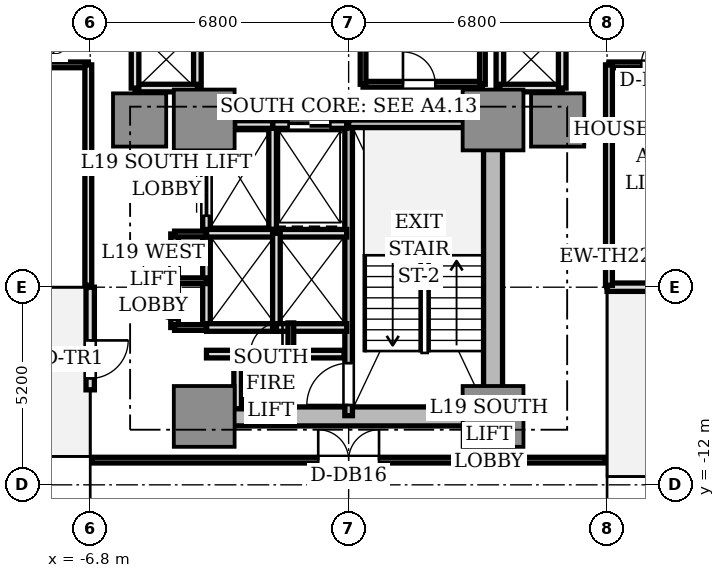
"""IFC4 building model, lengths in metres.
Left out: names, types, materials, properties, quantities, classifications, styles, units other than length and angle.
Written with IfcOpenShell. Run it as: python <this file> out.ifc"""

import sys

from ifc_helpers import new_model, si_unit, direction, frame, frame_2d, origin, origin_2d, place, context, subcontext, project, spatial, rectangle, extrude, source, transform, mapped, element, fill, save


model = new_model("IFC4")
c1 = context("Model", 3, precision=1e-05, world=origin(), true_north=direction((0.0, 1.0)))
c2 = subcontext(c1, "Body", "Model", "MODEL_VIEW")
j1 = project(units=[si_unit("LENGTHUNIT", "METRE"), si_unit("PLANEANGLEUNIT", "RADIAN")], contexts=[c1])
p1 = place(None, origin())
s1 = spatial("IfcSite", under=j1, at=p1, CompositionType="ELEMENT")
p2 = place(p1, origin())
s2 = spatial("IfcBuilding", under=s1, at=p2, CompositionType="ELEMENT")
p3 = place(p2, frame((0.0, 0.0, 71.15)))
s3 = spatial("IfcBuildingStorey", under=s2, at=p3, CompositionType="ELEMENT", Elevation=71.15)
p4 = place(p3, frame((-3.55, -10.2, 0.0), z_axis=(0.0, 0.0, 1.0), x_axis=(1.0, 0.0, 0.0)))
e1 = element("IfcWall", 1, at=p4, inside=s3, PredefinedType="SHEAR", context=c2, shape_type="SweptSolid", body=[
    extrude(rectangle(XDim=7.1, YDim=0.5, at=frame_2d((3.55, 0.0))), origin(), (0.0, 0.0, 1.0), 3.03),
])
p5 = place(p3, frame((3.8, -9.75, 0.0), z_axis=(0.0, 0.0, 1.0), x_axis=(0.0, 1.0, 0.0)))
e2 = element("IfcWall", 2, at=p5, inside=s3, PredefinedType="SHEAR", context=c2, shape_type="SweptSolid", body=[
    extrude(rectangle(XDim=6.9, YDim=0.5, at=frame_2d((3.45, 0.0))), origin(), (0.0, 0.0, 1.0), 3.03),
])
m1 = source(origin(), c2, "Body", "SweptSolid", [
    extrude(rectangle(XDim=1.6, YDim=1.6, at=origin_2d()), origin(), (0.0, 0.0, 1.0), 3.03),
])
for number, where, z_axis, x_axis in (
    (3, (-3.8, -2.4, 0.0), (0.0, 0.0, 1.0), (1.0, 0.0, 0.0)),
    (4, (3.8, -2.4, 0.0), (0.0, 0.0, 1.0), (1.0, 0.0, 0.0)),
    (5, (-3.8, -10.2, 0.0), (0.0, 0.0, 1.0), (1.0, 0.0, 0.0)),
    (6, (3.8, -10.2, 0.0), (0.0, 0.0, 1.0), (1.0, 0.0, 0.0)),
):
    element("IfcColumn", number, at=place(p3, frame(where, z_axis=z_axis, x_axis=x_axis)), inside=s3, PredefinedType="COLUMN", context=c2, shape_type="MappedRepresentation", body=[
        mapped(m1, transform((0.0, 0.0, 0.0), scale=1.0)),
    ])
m2 = source(origin(), c2, "Body", "SweptSolid", [
    extrude(rectangle(XDim=1.4, YDim=1.4, at=origin_2d()), origin(), (0.0, 0.0, 1.0), 3.03),
])
for number, where, z_axis, x_axis in (
    (7, (5.5, -2.4, 0.0), (0.0, 0.0, 1.0), (1.0, 0.0, 0.0)),
    (8, (-5.5, -2.4, 0.0), (0.0, 0.0, 1.0), (1.0, 0.0, 0.0)),
):
    element("IfcColumn", number, at=place(p3, frame(where, z_axis=z_axis, x_axis=x_axis)), inside=s3, PredefinedType="COLUMN", context=c2, shape_type="MappedRepresentation", body=[
        mapped(m2, transform((0.0, 0.0, 0.0), scale=1.0)),
    ])
p6 = place(p3, frame((6.8, -6.8, 0.0), z_axis=(0.0, 0.0, 1.0), x_axis=(1.0, 0.0, 0.0)))
e9 = element("IfcWall", 9, at=p6, inside=s3, PredefinedType="STANDARD", context=c2, shape_type="SweptSolid", body=[
    extrude(rectangle(XDim=2.7, YDim=0.22, at=frame_2d((1.35, 0.0))), origin(), (0.0, 0.0, 1.0), 3.03),
])
p7 = place(p6, frame((1.4, 0.0, 0.0)))
e10 = element("IfcOpeningElement", 10, at=p7, cuts=e9, PredefinedType="OPENING", context=c2, shape_type="SweptSolid", body=[
    extrude(rectangle(XDim=1.0, YDim=2.2, at=frame_2d((0.5, 1.1))), frame((0.0, 0.12, 0.0), z_axis=(0.0, -1.0, 0.0), x_axis=(1.0, 0.0, 0.0)), (0.0, 0.0, 1.0), 0.24),
])
p8 = place(p3, frame((-6.8, -6.8, 0.0), z_axis=(0.0, 0.0, 1.0), x_axis=(0.0, -1.0, 0.0)))
e11 = element("IfcWall", 11, at=p8, inside=s3, PredefinedType="STANDARD", context=c2, shape_type="SweptSolid", body=[
    extrude(rectangle(XDim=2.7, YDim=0.22, at=frame_2d((1.35, 0.0))), origin(), (0.0, 0.0, 1.0), 3.03),
])
p9 = place(p8, frame((1.4, 0.0, 0.0)))
e12 = element("IfcOpeningElement", 12, at=p9, cuts=e11, PredefinedType="OPENING", context=c2, shape_type="SweptSolid", body=[
    extrude(rectangle(XDim=1.0, YDim=2.2, at=frame_2d((0.5, 1.1))), frame((0.0, 0.12, 0.0), z_axis=(0.0, -1.0, 0.0), x_axis=(1.0, 0.0, 0.0)), (0.0, 0.0, 1.0), 0.24),
])
p10 = place(p3, frame((0.0, -10.18, 0.0), z_axis=(0.0, 0.0, 1.0), x_axis=(0.0, 1.0, 0.0)))
e13 = element("IfcWall", 13, at=p10, inside=s3, PredefinedType="SOLIDWALL", context=c2, shape_type="SweptSolid", body=[
    extrude(rectangle(XDim=7.68, YDim=0.2, at=frame_2d((3.84, 0.0))), origin(), (0.0, 0.0, 1.0), 3.03),
])
p11 = place(p10, frame((0.28, 0.0, 0.0)))
e14 = element("IfcOpeningElement", 14, at=p11, cuts=e13, PredefinedType="OPENING", context=c2, shape_type="SweptSolid", body=[
    extrude(rectangle(XDim=1.1, YDim=2.15, at=frame_2d((0.55, 1.075))), frame((0.0, 0.11, 0.0), z_axis=(0.0, -1.0, 0.0), x_axis=(1.0, 0.0, 0.0)), (0.0, 0.0, 1.0), 0.22),
])
p12 = place(p3, frame((0.0, -2.5, 0.0), z_axis=(0.0, 0.0, 1.0), x_axis=(1.0, 0.0, 0.0)))
e15 = element("IfcWall", 15, at=p12, inside=s3, PredefinedType="SOLIDWALL", context=c2, shape_type="SweptSolid", body=[
    extrude(rectangle(XDim=3.72, YDim=0.2, at=frame_2d((1.86, 0.0))), origin(), (0.0, 0.0, 1.0), 3.03),
])
p13 = place(p3, frame((-2.0, -5.28, 0.0), z_axis=(0.0, 0.0, 1.0), x_axis=(0.0, 1.0, 0.0)))
e16 = element("IfcWall", 16, at=p13, inside=s3, PredefinedType="SOLIDWALL", context=c2, shape_type="SweptSolid", body=[
    extrude(rectangle(XDim=2.78, YDim=0.2, at=frame_2d((1.39, 0.0))), origin(), (0.0, 0.0, 1.0), 2.58),
])
p14 = place(p3, frame((-2.0, -2.52, 0.0), z_axis=(0.0, 0.0, 1.0), x_axis=(1.0, 0.0, 0.0)))
e17 = element("IfcWall", 17, at=p14, inside=s3, PredefinedType="SOLIDWALL", context=c2, shape_type="SweptSolid", body=[
    extrude(rectangle(XDim=1.95, YDim=0.2, at=frame_2d((0.975, 0.0))), origin(), (0.0, 0.0, 1.0), 2.58),
])
p15 = place(p14, frame((0.42, 0.0, 0.0)))
e18 = element("IfcOpeningElement", 18, at=p15, cuts=e17, PredefinedType="OPENING", context=c2, shape_type="SweptSolid", body=[
    extrude(rectangle(XDim=1.1, YDim=2.2, at=frame_2d((0.55, 1.1))), frame((0.0, 0.11, 0.0), z_axis=(0.0, -1.0, 0.0), x_axis=(1.0, 0.0, 0.0)), (0.0, 0.0, 1.0), 0.22),
])
p16 = place(p3, frame((-3.0, -2.52, 0.0), z_axis=(0.0, 0.0, 1.0), x_axis=(1.0, 0.0, 0.0)))
e19 = element("IfcWall", 19, at=p16, inside=s3, PredefinedType="SOLIDWALL", context=c2, shape_type="SweptSolid", body=[
    extrude(rectangle(XDim=1.0, YDim=0.2, at=frame_2d((0.5, 0.0))), origin(), (0.0, 0.0, 1.0), 2.58),
])
p17 = place(p3, frame((-3.74, -5.36, 0.0), z_axis=(0.0, 0.0, 1.0), x_axis=(0.0, 1.0, 0.0)))
e20 = element("IfcWall", 20, at=p17, inside=s3, PredefinedType="SOLIDWALL", context=c2, shape_type="SweptSolid", body=[
    extrude(rectangle(XDim=2.08, YDim=0.2, at=frame_2d((1.04, 0.0))), origin(), (0.0, 0.0, 1.0), 2.58),
])
p18 = place(p17, frame((0.44, 0.0, 0.0)))
e21 = element("IfcOpeningElement", 21, at=p18, cuts=e20, PredefinedType="OPENING", context=c2, shape_type="SweptSolid", body=[
    extrude(rectangle(XDim=1.2, YDim=2.2, at=frame_2d((0.6, 1.1))), frame((0.0, 0.11, 0.0), z_axis=(0.0, -1.0, 0.0), x_axis=(1.0, 0.0, 0.0)), (0.0, 0.0, 1.0), 0.22),
])
p19 = place(p3, frame((-3.74, -7.86, 0.0), z_axis=(0.0, 0.0, 1.0), x_axis=(0.0, 1.0, 0.0)))
e22 = element("IfcWall", 22, at=p19, inside=s3, PredefinedType="SOLIDWALL", context=c2, shape_type="SweptSolid", body=[
    extrude(rectangle(XDim=2.48, YDim=0.2, at=frame_2d((1.24, 0.0))), origin(), (0.0, 0.0, 1.0), 2.58),
])
p20 = place(p3, frame((-3.74, -7.86, 0.0), z_axis=(0.0, 0.0, 1.0), x_axis=(1.0, 0.0, 0.0)))
e23 = element("IfcWall", 23, at=p20, inside=s3, PredefinedType="SOLIDWALL", context=c2, shape_type="SweptSolid", body=[
    extrude(rectangle(XDim=1.84, YDim=0.2, at=frame_2d((0.92, 0.0))), origin(), (0.0, 0.0, 1.0), 2.58),
])
p21 = place(p3, frame((-3.74, -5.38, 0.0), z_axis=(0.0, 0.0, 1.0), x_axis=(1.0, 0.0, 0.0)))
e24 = element("IfcWall", 24, at=p21, inside=s3, PredefinedType="SOLIDWALL", context=c2, shape_type="SweptSolid", body=[
    extrude(rectangle(XDim=3.69, YDim=0.2, at=frame_2d((1.845, 0.0))), origin(), (0.0, 0.0, 1.0), 2.58),
])
p22 = place(p3, frame((-1.9, -7.86, 0.0), z_axis=(0.0, 0.0, 1.0), x_axis=(0.0, 1.0, 0.0)))
e25 = element("IfcWall", 25, at=p22, inside=s3, PredefinedType="SOLIDWALL", context=c2, shape_type="SweptSolid", body=[
    extrude(rectangle(XDim=2.48, YDim=0.2, at=frame_2d((1.24, 0.0))), origin(), (0.0, 0.0, 1.0), 2.58),
])
p23 = place(p3, frame((-1.9, -7.86, 0.0), z_axis=(0.0, 0.0, 1.0), x_axis=(1.0, 0.0, 0.0)))
e26 = element("IfcWall", 26, at=p23, inside=s3, PredefinedType="SOLIDWALL", context=c2, shape_type="SweptSolid", body=[
    extrude(rectangle(XDim=1.85, YDim=0.2, at=frame_2d((0.925, 0.0))), origin(), (0.0, 0.0, 1.0), 2.58),
])
p24 = place(p3, frame((3.98, -1.56, 0.0), z_axis=(0.0, 0.0, 1.0), x_axis=(0.0, 1.0, 0.0)))
e27 = element("IfcWall", 27, at=p24, inside=s3, PredefinedType="SOLIDWALL", context=c2, shape_type="SweptSolid", body=[
    extrude(rectangle(XDim=3.12, YDim=0.2, at=frame_2d((1.56, 0.0))), origin(), (0.0, 0.0, 1.0), 2.1),
])
p25 = place(p3, frame((3.98, -1.56, 0.0), z_axis=(0.0, 0.0, 1.0), x_axis=(1.0, 0.0, 0.0)))
e28 = element("IfcWall", 28, at=p25, inside=s3, PredefinedType="SOLIDWALL", context=c2, shape_type="SweptSolid", body=[
    extrude(rectangle(XDim=1.64, YDim=0.2, at=frame_2d((0.82, 0.0))), origin(), (0.0, 0.0, 1.0), 2.58),
])
p26 = place(p3, frame((5.62, -1.56, 0.0), z_axis=(0.0, 0.0, 1.0), x_axis=(0.0, 1.0, 0.0)))
e29 = element("IfcWall", 29, at=p26, inside=s3, PredefinedType="SOLIDWALL", context=c2, shape_type="SweptSolid", body=[
    extrude(rectangle(XDim=1.56, YDim=0.2, at=frame_2d((0.78, 0.0))), origin(), (0.0, 0.0, 1.0), 2.58),
])
p27 = place(p3, frame((-3.98, -1.56, 0.0), z_axis=(0.0, 0.0, 1.0), x_axis=(0.0, 1.0, 0.0)))
e30 = element("IfcWall", 30, at=p27, inside=s3, PredefinedType="SOLIDWALL", context=c2, shape_type="SweptSolid", body=[
    extrude(rectangle(XDim=3.12, YDim=0.2, at=frame_2d((1.56, 0.0))), origin(), (0.0, 0.0, 1.0), 2.1),
])
p28 = place(p3, frame((-5.62, -1.56, 0.0), z_axis=(0.0, 0.0, 1.0), x_axis=(1.0, 0.0, 0.0)))
e31 = element("IfcWall", 31, at=p28, inside=s3, PredefinedType="SOLIDWALL", context=c2, shape_type="SweptSolid", body=[
    extrude(rectangle(XDim=1.64, YDim=0.2, at=frame_2d((0.82, 0.0))), origin(), (0.0, 0.0, 1.0), 2.58),
])
p29 = place(p3, frame((-5.62, -1.56, 0.0), z_axis=(0.0, 0.0, 1.0), x_axis=(0.0, 1.0, 0.0)))
e32 = element("IfcWall", 32, at=p29, inside=s3, PredefinedType="SOLIDWALL", context=c2, shape_type="SweptSolid", body=[
    extrude(rectangle(XDim=1.56, YDim=0.2, at=frame_2d((0.78, 0.0))), origin(), (0.0, 0.0, 1.0), 2.58),
])
p30 = place(p3, frame((-3.74, -8.56, 0.0), z_axis=(0.0, 0.0, 1.0), x_axis=(1.0, 0.0, 0.0)))
e33 = element("IfcWall", 33, at=p30, inside=s3, PredefinedType="SOLIDWALL", context=c2, shape_type="SweptSolid", body=[
    extrude(rectangle(XDim=3.62, YDim=0.2, at=frame_2d((1.81, 0.0))), origin(), (0.0, 0.0, 1.0), 2.58),
])
p31 = place(p30, frame((1.15, 0.0, 0.0)))
e34 = element("IfcOpeningElement", 34, at=p31, cuts=e33, PredefinedType="OPENING", context=c2, shape_type="SweptSolid", body=[
    extrude(rectangle(XDim=0.85, YDim=2.1, at=frame_2d((0.425, 1.05))), frame((0.0, 0.11, 0.0), z_axis=(0.0, -1.0, 0.0), x_axis=(1.0, 0.0, 0.0)), (0.0, 0.0, 1.0), 0.22),
])
p32 = place(p3, frame((-2.92, -10.0, 0.0), z_axis=(0.0, 0.0, 1.0), x_axis=(0.0, 1.0, 0.0)))
e35 = element("IfcWall", 35, at=p32, inside=s3, PredefinedType="SOLIDWALL", context=c2, shape_type="SweptSolid", body=[
    extrude(rectangle(XDim=1.44, YDim=0.2, at=frame_2d((0.72, 0.0))), origin(), (0.0, 0.0, 1.0), 2.58),
])
p33 = place(p3, frame((-1.52, -8.56, 0.0), z_axis=(0.0, 0.0, 1.0), x_axis=(0.0, 1.0, 0.0)))
e36 = element("IfcWall", 36, at=p33, inside=s3, PredefinedType="PARTITIONING", context=c2, shape_type="SweptSolid", body=[
    extrude(rectangle(XDim=0.82, YDim=0.15, at=frame_2d((0.41, 0.0))), origin(), (0.0, 0.0, 1.0), 2.58),
])
p34 = place(p3, frame((-4.58, -7.86, 0.0), z_axis=(0.0, 0.0, 1.0), x_axis=(0.0, 1.0, 0.0)))
e37 = element("IfcWall", 37, at=p34, inside=s3, PredefinedType="SOLIDWALL", context=c2, shape_type="SweptSolid", body=[
    extrude(rectangle(XDim=2.46, YDim=0.2, at=frame_2d((1.23, 0.0))), origin(), (0.0, 0.0, 1.0), 2.58),
])
p35 = place(p34, frame((0.2, 0.0, 0.0)))
e38 = element("IfcOpeningElement", 38, at=p35, cuts=e37, PredefinedType="OPENING", context=c2, shape_type="SweptSolid", body=[
    extrude(rectangle(XDim=0.85, YDim=2.1, at=frame_2d((0.425, 1.05))), frame((0.0, 0.11, 0.0), z_axis=(0.0, -1.0, 0.0), x_axis=(1.0, 0.0, 0.0)), (0.0, 0.0, 1.0), 0.22),
])
p36 = place(p34, frame((1.38, 0.0, 0.0)))
e39 = element("IfcOpeningElement", 39, at=p36, cuts=e37, PredefinedType="OPENING", context=c2, shape_type="SweptSolid", body=[
    extrude(rectangle(XDim=0.85, YDim=2.1, at=frame_2d((0.425, 1.05))), frame((0.0, 0.11, 0.0), z_axis=(0.0, -1.0, 0.0), x_axis=(1.0, 0.0, 0.0)), (0.0, 0.0, 1.0), 0.22),
])
for number, where, z_axis, x_axis in (
    (40, (-4.58, -5.4, 0.0), (0.0, 0.0, 1.0), (1.0, 0.0, 0.0)),
    (41, (-4.58, -7.86, 0.0), (0.0, 0.0, 1.0), (1.0, 0.0, 0.0)),
    (42, (-4.58, -6.63, 0.0), (0.0, 0.0, 1.0), (1.0, 0.0, 0.0)),
):
    element("IfcWall", number, at=place(p3, frame(where, z_axis=z_axis, x_axis=x_axis)), inside=s3, PredefinedType="PARTITIONING", context=c2, shape_type="SweptSolid", body=[
        extrude(rectangle(XDim=0.84, YDim=0.15, at=frame_2d((0.42, 0.0))), origin(), (0.0, 0.0, 1.0), 2.58),
    ])
p37 = place(p3, frame((0.38, -1.46, 0.0), z_axis=(0.0, 0.0, 1.0), x_axis=(1.0, 0.0, 0.0)))
e43 = element("IfcWall", 43, at=p37, inside=s3, PredefinedType="PARTITIONING", context=c2, shape_type="SweptSolid", body=[
    extrude(rectangle(XDim=3.14, YDim=0.15, at=frame_2d((1.57, 0.0))), origin(), (0.0, 0.0, 1.0), 2.58),
])
p38 = place(p37, frame((1.05, 0.0, 0.0)))
e44 = element("IfcOpeningElement", 44, at=p38, cuts=e43, PredefinedType="OPENING", context=c2, shape_type="SweptSolid", body=[
    extrude(rectangle(XDim=0.85, YDim=2.1, at=frame_2d((0.425, 1.05))), frame((0.0, 0.085, 0.0), z_axis=(0.0, -1.0, 0.0), x_axis=(1.0, 0.0, 0.0)), (0.0, 0.0, 1.0), 0.17),
])
p39 = place(p3, frame((0.38, -1.46, 0.0), z_axis=(0.0, 0.0, 1.0), x_axis=(0.0, 1.0, 0.0)))
e45 = element("IfcWall", 45, at=p39, inside=s3, PredefinedType="PARTITIONING", context=c2, shape_type="SweptSolid", body=[
    extrude(rectangle(XDim=1.36, YDim=0.15, at=frame_2d((0.68, 0.0))), origin(), (0.0, 0.0, 1.0), 2.58),
])
p40 = place(p3, frame((3.52, -1.46, 0.0), z_axis=(0.0, 0.0, 1.0), x_axis=(0.0, 1.0, 0.0)))
e46 = element("IfcWall", 46, at=p40, inside=s3, PredefinedType="PARTITIONING", context=c2, shape_type="SweptSolid", body=[
    extrude(rectangle(XDim=1.36, YDim=0.15, at=frame_2d((0.68, 0.0))), origin(), (0.0, 0.0, 1.0), 2.1),
])
p41 = place(p3, frame((6.85, -0.95, 0.0), z_axis=(0.0, 0.0, 1.0), x_axis=(1.0, 0.0, 0.0)))
e47 = element("IfcWall", 47, at=p41, inside=s3, PredefinedType="PARTITIONING", context=c2, shape_type="SweptSolid", body=[
    extrude(rectangle(XDim=17.9, YDim=0.15, at=frame_2d((8.95, 0.0))), origin(), (0.0, 0.0, 1.0), 2.58),
])
p42 = place(p41, frame((0.85, 0.0, 0.0)))
e48 = element("IfcOpeningElement", 48, at=p42, cuts=e47, PredefinedType="OPENING", context=c2, shape_type="SweptSolid", body=[
    extrude(rectangle(XDim=0.85, YDim=2.1, at=frame_2d((0.425, 1.05))), frame((0.0, 0.085, 0.0), z_axis=(0.0, -1.0, 0.0), x_axis=(1.0, 0.0, 0.0)), (0.0, 0.0, 1.0), 0.17),
])
p43 = place(p41, frame((8.575, 0.0, 0.0)))
e49 = element("IfcOpeningElement", 49, at=p43, cuts=e47, PredefinedType="OPENING", context=c2, shape_type="SweptSolid", body=[
    extrude(rectangle(XDim=0.85, YDim=2.1, at=frame_2d((0.425, 1.05))), frame((0.0, 0.085, 0.0), z_axis=(0.0, -1.0, 0.0), x_axis=(1.0, 0.0, 0.0)), (0.0, 0.0, 1.0), 0.17),
])
p44 = place(p3, frame((6.85, -6.75, 0.0), z_axis=(0.0, 0.0, 1.0), x_axis=(0.0, 1.0, 0.0)))
e50 = element("IfcWall", 50, at=p44, inside=s3, PredefinedType="PARTITIONING", context=c2, shape_type="SweptSolid", body=[
    extrude(rectangle(XDim=5.8, YDim=0.18, at=frame_2d((2.9, 0.0))), origin(), (0.0, 0.0, 1.0), 2.58),
])
p45 = place(p3, frame((-6.85, -0.95, 0.0), z_axis=(0.0, 0.0, 1.0), x_axis=(-1.0, 0.0, 0.0)))
e51 = element("IfcWall", 51, at=p45, inside=s3, PredefinedType="PARTITIONING", context=c2, shape_type="SweptSolid", body=[
    extrude(rectangle(XDim=3.35, YDim=0.15, at=frame_2d((1.675, 0.0))), origin(), (0.0, 0.0, 1.0), 2.58),
])
p46 = place(p45, frame((1.2, 0.0, 0.0)))
e52 = element("IfcOpeningElement", 52, at=p46, cuts=e51, PredefinedType="OPENING", context=c2, shape_type="SweptSolid", body=[
    extrude(rectangle(XDim=0.85, YDim=2.1, at=frame_2d((0.425, 1.05))), frame((0.0, 0.085, 0.0), z_axis=(0.0, -1.0, 0.0), x_axis=(1.0, 0.0, 0.0)), (0.0, 0.0, 1.0), 0.17),
])
p47 = place(p3, frame((-6.85, -0.95, 0.0), z_axis=(0.0, 0.0, 1.0), x_axis=(0.0, -1.0, 0.0)))
e53 = element("IfcWall", 53, at=p47, inside=s3, PredefinedType="PARTITIONING", context=c2, shape_type="SweptSolid", body=[
    extrude(rectangle(XDim=5.8, YDim=0.18, at=frame_2d((2.9, 0.0))), origin(), (0.0, 0.0, 1.0), 2.58),
])
p48 = place(p3, frame((-6.75, -11.35, 0.0), z_axis=(0.0, 0.0, 1.0), x_axis=(1.0, 0.0, 0.0)))
e54 = element("IfcWall", 54, at=p48, inside=s3, PredefinedType="PARTITIONING", context=c2, shape_type="SweptSolid", body=[
    extrude(rectangle(XDim=13.5, YDim=0.15, at=frame_2d((6.75, 0.0))), origin(), (0.0, 0.0, 1.0), 2.58),
])
p49 = place(p48, frame((5.95, 0.0, 0.0)))
e55 = element("IfcOpeningElement", 55, at=p49, cuts=e54, PredefinedType="OPENING", context=c2, shape_type="SweptSolid", body=[
    extrude(rectangle(XDim=1.6, YDim=2.25, at=frame_2d((0.8, 1.125))), frame((0.0, 0.085, 0.0), z_axis=(0.0, -1.0, 0.0), x_axis=(1.0, 0.0, 0.0)), (0.0, 0.0, 1.0), 0.17),
])
m3 = source(origin(), c2, "Body", "SweptSolid", [
    extrude(rectangle(XDim=1.0, YDim=0.05, at=origin_2d()), origin(), (0.0, 0.0, 1.0), 2.2),
])
p50 = place(p9, frame((0.5, 0.0, 0.0)))
e56 = element("IfcDoor", 56, at=p50, inside=s3, OperationType="SINGLE_SWING_LEFT", PredefinedType="DOOR", context=c2, shape_type="MappedRepresentation", body=[
    mapped(m3, transform((0.0, 0.0, 0.0), scale=1.0)),
])
fill(e12, e56)
m4 = source(origin(), c2, "Body", "SweptSolid", [
    extrude(rectangle(XDim=1.1, YDim=0.05, at=origin_2d()), origin(), (0.0, 0.0, 1.0), 2.2),
])
p51 = place(p15, frame((0.55, 0.0, 0.0)))
e57 = element("IfcDoor", 57, at=p51, inside=s3, OperationType="DOUBLE_DOOR_SLIDING", PredefinedType="DOOR", context=c2, shape_type="MappedRepresentation", body=[
    mapped(m4, transform((0.0, 0.0, 0.0), scale=1.0)),
])
fill(e18, e57)
m5 = source(origin(), c2, "Body", "SweptSolid", [
    extrude(rectangle(XDim=1.2, YDim=0.05, at=origin_2d()), origin(), (0.0, 0.0, 1.0), 2.2),
])
p52 = place(p18, frame((0.6, 0.0, 0.0)))
e58 = element("IfcDoor", 58, at=p52, inside=s3, OperationType="DOUBLE_DOOR_SLIDING", PredefinedType="DOOR", context=c2, shape_type="MappedRepresentation", body=[
    mapped(m5, transform((0.0, 0.0, 0.0), scale=1.0)),
])
fill(e21, e58)
m6 = source(origin(), c2, "Body", "SweptSolid", [
    extrude(rectangle(XDim=1.1, YDim=0.05, at=origin_2d()), origin(), (0.0, 0.0, 1.0), 2.15),
])
p53 = place(p11, frame((0.55, 0.0, 0.0)))
e59 = element("IfcDoor", 59, at=p53, inside=s3, OperationType="SINGLE_SWING_LEFT", PredefinedType="DOOR", context=c2, shape_type="MappedRepresentation", body=[
    mapped(m6, transform((0.0, 0.0, 0.0), scale=1.0)),
])
fill(e14, e59)
m7 = source(origin(), c2, "Body", "SweptSolid", [
    extrude(rectangle(XDim=0.85, YDim=0.05, at=origin_2d()), origin(), (0.0, 0.0, 1.0), 2.1),
])
p54 = place(p31, frame((0.425, 0.0, 0.0)))
e60 = element("IfcDoor", 60, at=p54, inside=s3, OperationType="SINGLE_SWING_RIGHT", PredefinedType="DOOR", context=c2, shape_type="MappedRepresentation", body=[
    mapped(m7, transform((0.0, 0.0, 0.0), scale=1.0)),
])
fill(e34, e60)
p55 = place(p35, frame((0.425, 0.0, 0.0)))
e61 = element("IfcDoor", 61, at=p55, inside=s3, OperationType="SINGLE_SWING_RIGHT", PredefinedType="DOOR", context=c2, shape_type="MappedRepresentation", body=[
    mapped(m7, transform((0.0, 0.0, 0.0), scale=1.0)),
])
fill(e38, e61)
p56 = place(p36, frame((0.425, 0.0, 0.0)))
e62 = element("IfcDoor", 62, at=p56, inside=s3, OperationType="SINGLE_SWING_LEFT", PredefinedType="DOOR", context=c2, shape_type="MappedRepresentation", body=[
    mapped(m7, transform((0.0, 0.0, 0.0), scale=1.0)),
])
fill(e39, e62)
p57 = place(p38, frame((0.425, 0.0, 0.0)))
e63 = element("IfcDoor", 63, at=p57, inside=s3, OperationType="SINGLE_SWING_LEFT", PredefinedType="DOOR", context=c2, shape_type="MappedRepresentation", body=[
    mapped(m7, transform((0.0, 0.0, 0.0), scale=1.0)),
])
fill(e44, e63)
p58 = place(p42, frame((0.425, 0.0, 0.0)))
e64 = element("IfcDoor", 64, at=p58, inside=s3, OperationType="SINGLE_SWING_RIGHT", PredefinedType="DOOR", context=c2, shape_type="MappedRepresentation", body=[
    mapped(m7, transform((0.0, 0.0, 0.0), scale=1.0)),
])
fill(e48, e64)
m8 = source(origin(), c2, "Body", "SweptSolid", [
    extrude(rectangle(XDim=1.6, YDim=0.05, at=origin_2d()), origin(), (0.0, 0.0, 1.0), 2.25),
])
p59 = place(p49, frame((0.8, 0.0, 0.0)))
e65 = element("IfcDoor", 65, at=p59, inside=s3, OperationType="DOUBLE_DOOR_SINGLE_SWING", PredefinedType="DOOR", context=c2, shape_type="MappedRepresentation", body=[
    mapped(m8, transform((0.0, 0.0, 0.0), scale=1.0)),
])
fill(e55, e65)
save(model, sys.argv[1])
